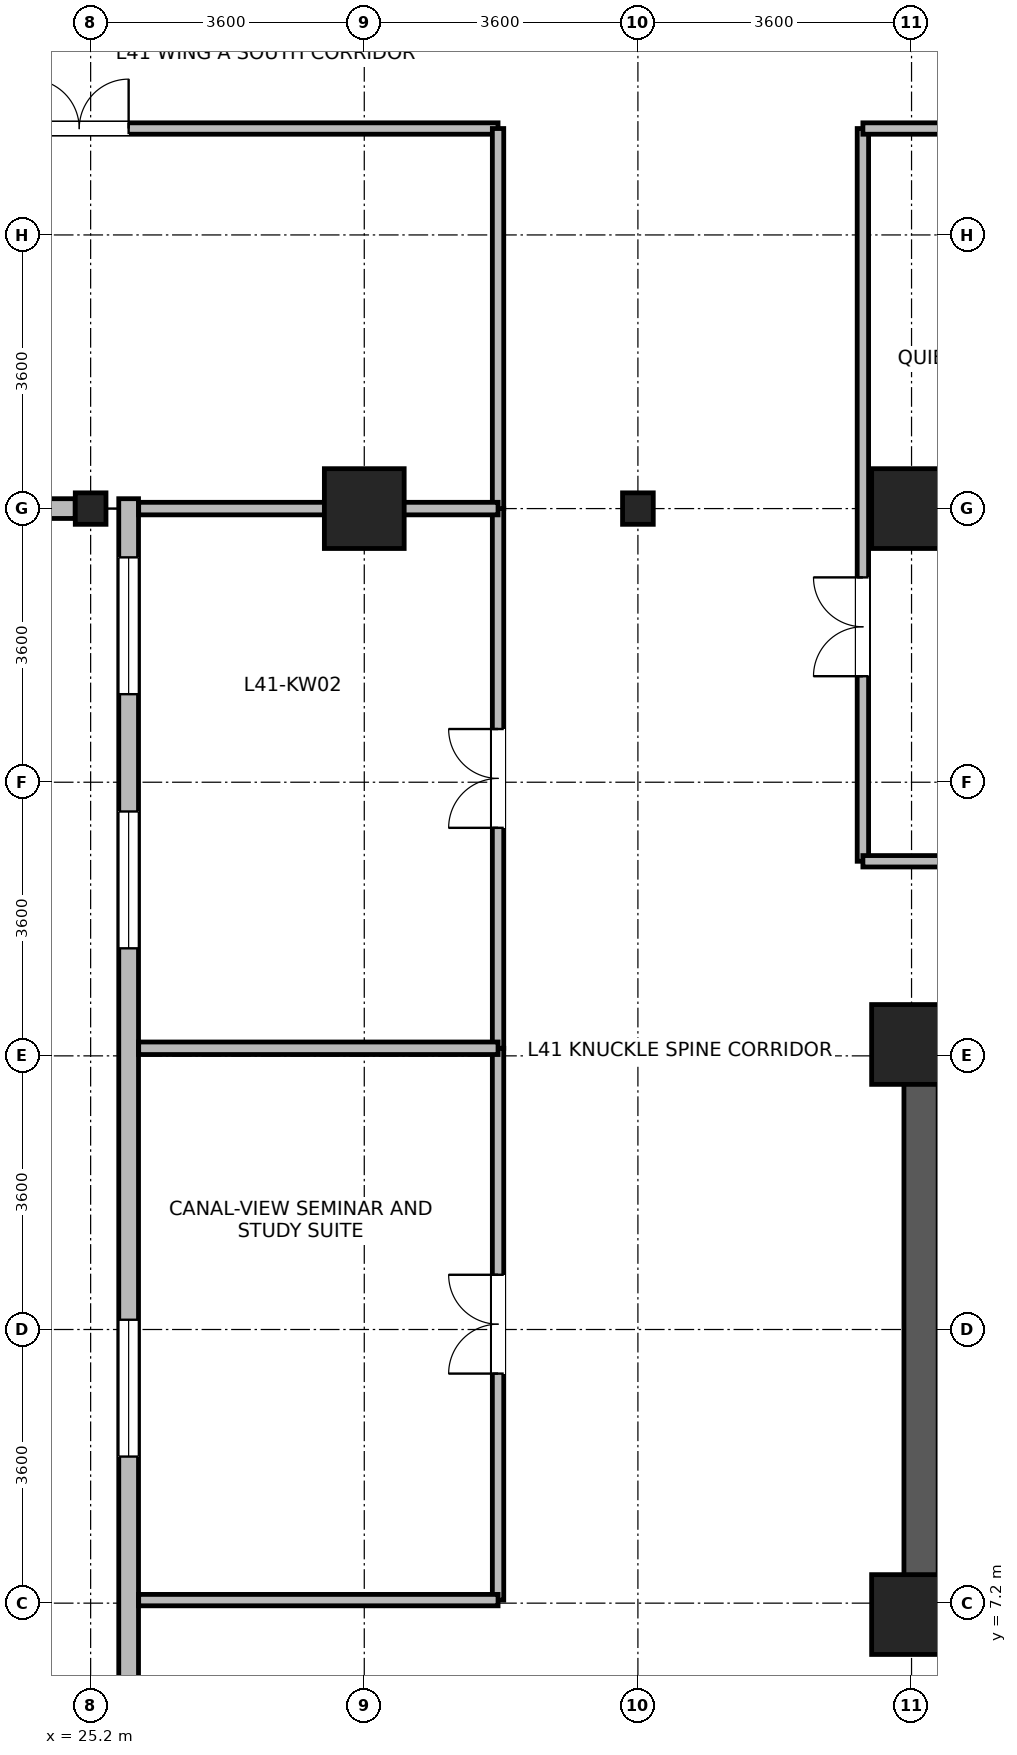
"""IFC4 building model, lengths in metres.
Left out: names, types, materials, properties, quantities, classifications, styles, units other than length and angle.
Written with IfcOpenShell. Run it as: python <this file> out.ifc"""

import sys

from ifc_helpers import new_model, si_unit, direction, frame, frame_2d, origin, origin_2d, place, context, subcontext, project, spatial, rectangle, i_section, extrude, source, transform, mapped, element, fill, save


model = new_model("IFC4")
c1 = context("Model", 3, precision=1e-05, world=origin(), true_north=direction((0.0, 1.0)))
c2 = subcontext(c1, "Body", "Model", "MODEL_VIEW")
j1 = project(units=[si_unit("LENGTHUNIT", "METRE"), si_unit("PLANEANGLEUNIT", "RADIAN")], contexts=[c1])
p1 = place(None, origin())
s1 = spatial("IfcSite", under=j1, at=p1, CompositionType="ELEMENT")
p2 = place(p1, origin())
s2 = spatial("IfcBuilding", under=s1, at=p2, CompositionType="ELEMENT")
p3 = place(p2, frame((0.0, 0.0, 162.4)))
s3 = spatial("IfcBuildingStorey", under=s2, at=p3, CompositionType="ELEMENT", Elevation=162.4)
p4 = place(p3, frame((36.125, 6.85, 0.0), z_axis=(0.0, 0.0, 1.0), x_axis=(0.0, 1.0, 0.0)))
e1 = element("IfcWall", 1, at=p4, inside=s3, PredefinedType="SHEAR", context=c2, shape_type="SweptSolid", body=[
    extrude(rectangle(XDim=7.9, YDim=0.45, at=frame_2d((3.95, 0.0))), origin(), (0.0, 0.0, 1.0), 3.46),
])
m1 = source(origin(), c2, "Body", "SweptSolid", [
    extrude(rectangle(XDim=1.05, YDim=1.05, at=origin_2d()), origin(), (0.0, 0.0, 1.0), 3.7),
])
for number, where, z_axis, x_axis in (
    (2, (28.8, 21.6, 0.0), (0.0, 0.0, 1.0), (1.0, 0.0, 0.0)),
    (3, (36.0, 21.6, 0.0), (0.0, 0.0, 1.0), (1.0, 0.0, 0.0)),
    (4, (36.0, 7.05, 0.0), (0.0, 0.0, 1.0), (1.0, 0.0, 0.0)),
    (5, (36.0, 14.55, 0.0), (0.0, 0.0, 1.0), (1.0, 0.0, 0.0)),
):
    element("IfcColumn", number, at=place(p3, frame(where, z_axis=z_axis, x_axis=x_axis)), inside=s3, PredefinedType="COLUMN", context=c2, shape_type="MappedRepresentation", body=[
        mapped(m1, transform((0.0, 0.0, 0.0), x_axis=(1.0, 0.0, 0.0), y_axis=(0.0, 1.0, 0.0), z_axis=(0.0, 0.0, 1.0), scale=1.0)),
    ])
m2 = source(origin(), c2, "Body", "SweptSolid", [
    extrude(i_section(OverallWidth=0.404, OverallDepth=0.414, WebThickness=0.021, FlangeThickness=0.028, FilletRadius=0.015, at=origin_2d()), origin(), (0.0, 0.0, 1.0), 3.7),
])
for number, where, z_axis, x_axis in (
    (6, (25.2, 21.6, 0.0), (0.0, 0.0, 1.0), (1.0, 0.0, 0.0)),
    (7, (32.4, 21.6, 0.0), (0.0, 0.0, 1.0), (1.0, 0.0, 0.0)),
):
    element("IfcColumn", number, at=place(p3, frame(where, z_axis=z_axis, x_axis=x_axis)), inside=s3, PredefinedType="COLUMN", context=c2, shape_type="MappedRepresentation", body=[
        mapped(m2, transform((0.0, 0.0, 0.0), x_axis=(1.0, 0.0, 0.0), y_axis=(0.0, 1.0, 0.0), z_axis=(0.0, 0.0, 1.0), scale=1.0)),
    ])
p5 = place(p3, frame((24.997, 21.6, 0.0), z_axis=(0.0, 0.0, 1.0), x_axis=(-1.0, 0.0, 0.0)))
e8 = element("IfcWall", 8, at=p5, inside=s3, PredefinedType="STANDARD", context=c2, shape_type="SweptSolid", body=[
    extrude(rectangle(XDim=2.871, YDim=0.26, at=frame_2d((1.436, 0.0))), origin(), (0.0, 0.0, 1.0), 2.99),
])
p6 = place(p5, frame((0.96, 0.0, 0.85)))
e9 = element("IfcOpeningElement", 9, at=p6, cuts=e8, PredefinedType="OPENING", context=c2, shape_type="SweptSolid", body=[
    extrude(rectangle(XDim=0.95, YDim=1.75, at=frame_2d((0.475, 0.875))), frame((0.0, 0.14, 0.0), z_axis=(0.0, -1.0, 0.0), x_axis=(1.0, 0.0, 0.0)), (0.0, 0.0, 1.0), 0.28),
])
p7 = place(p3, frame((25.7, 1.67, 0.0), z_axis=(0.0, 0.0, 1.0), x_axis=(0.0, 1.0, 0.0)))
e10 = element("IfcWall", 10, at=p7, inside=s3, PredefinedType="STANDARD", context=c2, shape_type="SweptSolid", body=[
    extrude(rectangle(XDim=20.06, YDim=0.26, at=frame_2d((10.03, 0.0))), origin(), (0.0, 0.0, 1.0), 3.44),
])
p8 = place(p7, frame((0.772, 0.0, 0.85)))
e11 = element("IfcOpeningElement", 11, at=p8, cuts=e10, PredefinedType="OPENING", context=c2, shape_type="SweptSolid", body=[
    extrude(rectangle(XDim=1.8, YDim=1.85, at=frame_2d((0.9, 0.925))), frame((0.0, 0.14, 0.0), z_axis=(0.0, -1.0, 0.0), x_axis=(1.0, 0.0, 0.0)), (0.0, 0.0, 1.0), 0.28),
])
p9 = place(p7, frame((7.458, 0.0, 0.85)))
e12 = element("IfcOpeningElement", 12, at=p9, cuts=e10, PredefinedType="OPENING", context=c2, shape_type="SweptSolid", body=[
    extrude(rectangle(XDim=1.8, YDim=1.85, at=frame_2d((0.9, 0.925))), frame((0.0, 0.14, 0.0), z_axis=(0.0, -1.0, 0.0), x_axis=(1.0, 0.0, 0.0)), (0.0, 0.0, 1.0), 0.28),
])
p10 = place(p7, frame((14.145, 0.0, 0.85)))
e13 = element("IfcOpeningElement", 13, at=p10, cuts=e10, PredefinedType="OPENING", context=c2, shape_type="SweptSolid", body=[
    extrude(rectangle(XDim=1.8, YDim=1.85, at=frame_2d((0.9, 0.925))), frame((0.0, 0.14, 0.0), z_axis=(0.0, -1.0, 0.0), x_axis=(1.0, 0.0, 0.0)), (0.0, 0.0, 1.0), 0.28),
])
p11 = place(p7, frame((17.488, 0.0, 0.85)))
e14 = element("IfcOpeningElement", 14, at=p11, cuts=e10, PredefinedType="OPENING", context=c2, shape_type="SweptSolid", body=[
    extrude(rectangle(XDim=1.8, YDim=1.85, at=frame_2d((0.9, 0.925))), frame((0.0, 0.14, 0.0), z_axis=(0.0, -1.0, 0.0), x_axis=(1.0, 0.0, 0.0)), (0.0, 0.0, 1.0), 0.28),
])
p12 = place(p3, frame((19.54, 26.6, 0.0), z_axis=(0.0, 0.0, 1.0), x_axis=(1.0, 0.0, 0.0)))
e15 = element("IfcWall", 15, at=p12, inside=s3, PredefinedType="PARTITIONING", context=c2, shape_type="SweptSolid", body=[
    extrude(rectangle(XDim=11.02, YDim=0.15, at=frame_2d((5.51, 0.0))), origin(), (0.0, 0.0, 1.0), 3.44),
])
p13 = place(p12, frame((4.86, 0.0, 0.0)))
e16 = element("IfcOpeningElement", 16, at=p13, cuts=e15, PredefinedType="OPENING", context=c2, shape_type="SweptSolid", body=[
    extrude(rectangle(XDim=1.3, YDim=2.12, at=frame_2d((0.65, 1.06))), frame((0.0, 0.085, 0.0), z_axis=(0.0, -1.0, 0.0), x_axis=(1.0, 0.0, 0.0)), (0.0, 0.0, 1.0), 0.17),
])
p14 = place(p3, frame((35.36, 16.96, 0.0), z_axis=(0.0, 0.0, 1.0), x_axis=(0.0, 1.0, 0.0)))
e17 = element("IfcWall", 17, at=p14, inside=s3, PredefinedType="PARTITIONING", context=c2, shape_type="SweptSolid", body=[
    extrude(rectangle(XDim=9.64, YDim=0.15, at=frame_2d((4.82, 0.0))), origin(), (0.0, 0.0, 1.0), 3.44),
])
p15 = place(p14, frame((2.435, 0.0, 0.0)))
e18 = element("IfcOpeningElement", 18, at=p15, cuts=e17, PredefinedType="OPENING", context=c2, shape_type="SweptSolid", body=[
    extrude(rectangle(XDim=1.3, YDim=2.12, at=frame_2d((0.65, 1.06))), frame((0.0, 0.085, 0.0), z_axis=(0.0, -1.0, 0.0), x_axis=(1.0, 0.0, 0.0)), (0.0, 0.0, 1.0), 0.17),
])
p16 = place(p3, frame((30.56, 7.24, 0.0), z_axis=(0.0, 0.0, 1.0), x_axis=(0.0, 1.0, 0.0)))
e19 = element("IfcWall", 19, at=p16, inside=s3, PredefinedType="PARTITIONING", context=c2, shape_type="SweptSolid", body=[
    extrude(rectangle(XDim=7.26, YDim=0.15, at=frame_2d((3.63, 0.0))), origin(), (0.0, 0.0, 1.0), 3.44),
])
p17 = place(p16, frame((2.98, 0.0, 0.0)))
e20 = element("IfcOpeningElement", 20, at=p17, cuts=e19, PredefinedType="OPENING", context=c2, shape_type="SweptSolid", body=[
    extrude(rectangle(XDim=1.3, YDim=2.12, at=frame_2d((0.65, 1.06))), frame((0.0, 0.085, 0.0), z_axis=(0.0, -1.0, 0.0), x_axis=(1.0, 0.0, 0.0)), (0.0, 0.0, 1.0), 0.17),
])
p18 = place(p3, frame((30.56, 14.5, 0.0), z_axis=(0.0, 0.0, 1.0), x_axis=(0.0, 1.0, 0.0)))
e21 = element("IfcWall", 21, at=p18, inside=s3, PredefinedType="PARTITIONING", context=c2, shape_type="SweptSolid", body=[
    extrude(rectangle(XDim=7.1, YDim=0.15, at=frame_2d((3.55, 0.0))), origin(), (0.0, 0.0, 1.0), 3.44),
])
p19 = place(p18, frame((2.9, 0.0, 0.0)))
e22 = element("IfcOpeningElement", 22, at=p19, cuts=e21, PredefinedType="OPENING", context=c2, shape_type="SweptSolid", body=[
    extrude(rectangle(XDim=1.3, YDim=2.12, at=frame_2d((0.65, 1.06))), frame((0.0, 0.085, 0.0), z_axis=(0.0, -1.0, 0.0), x_axis=(1.0, 0.0, 0.0)), (0.0, 0.0, 1.0), 0.17),
])
for number, where, z_axis, x_axis in (
    (23, (35.36, 16.96, 0.0), (0.0, 0.0, 1.0), (1.0, 0.0, 0.0)),
    (24, (35.36, 26.6, 0.0), (0.0, 0.0, 1.0), (1.0, 0.0, 0.0)),
):
    element("IfcWall", number, at=place(p3, frame(where, z_axis=z_axis, x_axis=x_axis)), inside=s3, PredefinedType="PARTITIONING", context=c2, shape_type="SweptSolid", body=[
        extrude(rectangle(XDim=5.38, YDim=0.15, at=frame_2d((2.69, 0.0))), origin(), (0.0, 0.0, 1.0), 3.44),
    ])
p20 = place(p3, frame((30.56, 21.6, 0.0), z_axis=(0.0, 0.0, 1.0), x_axis=(0.0, 1.0, 0.0)))
e25 = element("IfcWall", 25, at=p20, inside=s3, PredefinedType="PARTITIONING", context=c2, shape_type="SweptSolid", body=[
    extrude(rectangle(XDim=5.0, YDim=0.15, at=frame_2d((2.5, 0.0))), origin(), (0.0, 0.0, 1.0), 3.44),
])
p21 = place(p3, frame((25.832, 7.24, 0.0), z_axis=(0.0, 0.0, 1.0), x_axis=(1.0, 0.0, 0.0)))
e26 = element("IfcWall", 26, at=p21, inside=s3, PredefinedType="PARTITIONING", context=c2, shape_type="SweptSolid", body=[
    extrude(rectangle(XDim=4.728, YDim=0.15, at=frame_2d((2.364, 0.0))), origin(), (0.0, 0.0, 1.0), 3.44),
])
p22 = place(p3, frame((25.832, 14.5, 0.0), z_axis=(0.0, 0.0, 1.0), x_axis=(1.0, 0.0, 0.0)))
e27 = element("IfcWall", 27, at=p22, inside=s3, PredefinedType="PARTITIONING", context=c2, shape_type="SweptSolid", body=[
    extrude(rectangle(XDim=4.728, YDim=0.165, at=frame_2d((2.364, 0.0))), origin(), (0.0, 0.0, 1.0), 3.44),
])
p23 = place(p3, frame((25.832, 21.6, 0.0), z_axis=(0.0, 0.0, 1.0), x_axis=(1.0, 0.0, 0.0)))
e28 = element("IfcWall", 28, at=p23, inside=s3, PredefinedType="PARTITIONING", context=c2, shape_type="SweptSolid", body=[
    extrude(rectangle(XDim=4.728, YDim=0.165, at=frame_2d((2.364, 0.0))), origin(), (0.0, 0.0, 1.0), 2.99),
])
p24 = place(p9, origin())
e29 = element("IfcWindow", 29, at=p24, inside=s3, PartitioningType="SINGLE_PANEL", PredefinedType="WINDOW", context=c2, shape_type="SweptSolid", body=[
    extrude(rectangle(XDim=1.8, YDim=1.85, at=frame_2d((0.9, 0.925))), frame((0.0, 0.03, 0.0), z_axis=(0.0, -1.0, 0.0), x_axis=(1.0, 0.0, 0.0)), (0.0, 0.0, 1.0), 0.06),
])
fill(e12, e29)
p25 = place(p10, origin())
e30 = element("IfcWindow", 30, at=p25, inside=s3, PartitioningType="SINGLE_PANEL", PredefinedType="WINDOW", context=c2, shape_type="SweptSolid", body=[
    extrude(rectangle(XDim=1.8, YDim=1.85, at=frame_2d((0.9, 0.925))), frame((0.0, 0.03, 0.0), z_axis=(0.0, -1.0, 0.0), x_axis=(1.0, 0.0, 0.0)), (0.0, 0.0, 1.0), 0.06),
])
fill(e13, e30)
p26 = place(p11, origin())
e31 = element("IfcWindow", 31, at=p26, inside=s3, PartitioningType="SINGLE_PANEL", PredefinedType="WINDOW", context=c2, shape_type="SweptSolid", body=[
    extrude(rectangle(XDim=1.8, YDim=1.85, at=frame_2d((0.9, 0.925))), frame((0.0, 0.03, 0.0), z_axis=(0.0, -1.0, 0.0), x_axis=(1.0, 0.0, 0.0)), (0.0, 0.0, 1.0), 0.06),
])
fill(e14, e31)
p27 = place(p13, origin())
e32 = element("IfcDoor", 32, at=p27, inside=s3, OperationType="DOUBLE_DOOR_SINGLE_SWING", PredefinedType="DOOR", context=c2, shape_type="SweptSolid", body=[
    extrude(rectangle(XDim=1.3, YDim=2.12, at=frame_2d((0.65, 1.06))), frame((0.0, 0.025, 0.0), z_axis=(0.0, -1.0, 0.0), x_axis=(1.0, 0.0, 0.0)), (0.0, 0.0, 1.0), 0.05),
])
fill(e16, e32)
p28 = place(p15, origin())
e33 = element("IfcDoor", 33, at=p28, inside=s3, OperationType="DOUBLE_DOOR_SINGLE_SWING", PredefinedType="DOOR", context=c2, shape_type="SweptSolid", body=[
    extrude(rectangle(XDim=1.3, YDim=2.12, at=frame_2d((0.65, 1.06))), frame((0.0, 0.025, 0.0), z_axis=(0.0, -1.0, 0.0), x_axis=(1.0, 0.0, 0.0)), (0.0, 0.0, 1.0), 0.05),
])
fill(e18, e33)
p29 = place(p17, origin())
e34 = element("IfcDoor", 34, at=p29, inside=s3, OperationType="DOUBLE_DOOR_SINGLE_SWING", PredefinedType="DOOR", context=c2, shape_type="SweptSolid", body=[
    extrude(rectangle(XDim=1.3, YDim=2.12, at=frame_2d((0.65, 1.06))), frame((0.0, 0.025, 0.0), z_axis=(0.0, -1.0, 0.0), x_axis=(1.0, 0.0, 0.0)), (0.0, 0.0, 1.0), 0.05),
])
fill(e20, e34)
p30 = place(p19, origin())
e35 = element("IfcDoor", 35, at=p30, inside=s3, OperationType="DOUBLE_DOOR_SINGLE_SWING", PredefinedType="DOOR", context=c2, shape_type="SweptSolid", body=[
    extrude(rectangle(XDim=1.3, YDim=2.12, at=frame_2d((0.65, 1.06))), frame((0.0, 0.025, 0.0), z_axis=(0.0, -1.0, 0.0), x_axis=(1.0, 0.0, 0.0)), (0.0, 0.0, 1.0), 0.05),
])
fill(e22, e35)
save(model, sys.argv[1])
